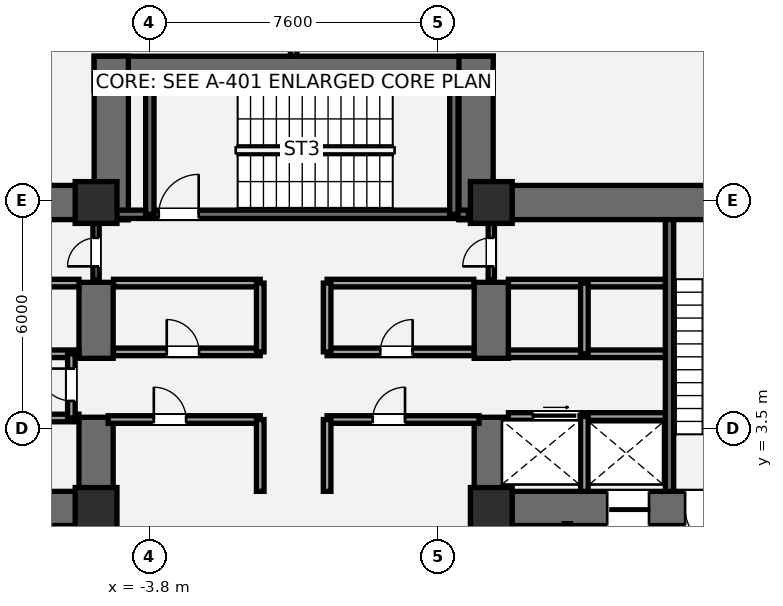
"""IFC4 building model, lengths in metres.
Left out: names, types, materials, properties, quantities, classifications, styles, units other than length and angle.
Written with IfcOpenShell. Run it as: python <this file> out.ifc"""

import sys

from ifc_helpers import new_model, si_unit, direction, frame, frame_2d, origin, origin_2d, place, context, subcontext, project, spatial, rectangle, extrude, element, fill, save


model = new_model("IFC4")
c1 = context("Model", 3, precision=1e-05, world=origin(), true_north=direction((0.0, 1.0)))
c2 = subcontext(c1, "Body", "Model", "MODEL_VIEW")
j1 = project(units=[si_unit("LENGTHUNIT", "METRE"), si_unit("PLANEANGLEUNIT", "RADIAN")], contexts=[c1])
p1 = place(None, origin())
s1 = spatial("IfcSite", under=j1, at=p1, CompositionType="ELEMENT")
p2 = place(p1, origin())
s2 = spatial("IfcBuilding", under=s1, at=p2, CompositionType="ELEMENT")
p3 = place(p2, frame((0.0, 0.0, -8.8)))
s3 = spatial("IfcBuildingStorey", under=s2, at=p3, CompositionType="ELEMENT", Elevation=-8.8)
p4 = place(p3, frame((-14.05, 9.45, 0.0), z_axis=(0.0, 0.0, 1.0), x_axis=(1.0, 0.0, 0.0)))
e1 = element("IfcWall", 1, at=p4, inside=s3, PredefinedType="SHEAR", context=c2, shape_type="SweptSolid", body=[
    extrude(rectangle(XDim=9.7, YDim=0.9, at=frame_2d((4.85, 0.0))), origin(), (0.0, 0.0, 1.0), 4.4),
])
p5 = place(p3, frame((-4.75, 1.4, 0.0), z_axis=(0.0, 0.0, 1.0), x_axis=(-1.0, 0.0, 0.0)))
e2 = element("IfcWall", 2, at=p5, inside=s3, PredefinedType="SHEAR", context=c2, shape_type="SweptSolid", body=[
    extrude(rectangle(XDim=9.3, YDim=0.9, at=frame_2d((4.65, 0.0))), origin(), (0.0, 0.0, 1.0), 4.4),
])
p6 = place(p5, frame((5.55, 0.0, 0.0)))
e3 = element("IfcOpeningElement", 3, at=p6, cuts=e2, PredefinedType="OPENING", context=c2, shape_type="SweptSolid", body=[
    extrude(rectangle(XDim=1.05, YDim=2.15, at=frame_2d((0.525, 1.075))), frame((0.0, 0.46, 0.0), z_axis=(0.0, -1.0, 0.0), x_axis=(1.0, 0.0, 0.0)), (0.0, 0.0, 1.0), 0.92),
])
p7 = place(p5, frame((3.88, 0.0, 0.0)))
e4 = element("IfcOpeningElement", 4, at=p7, cuts=e2, PredefinedType="OPENING", context=c2, shape_type="SweptSolid", body=[
    extrude(rectangle(XDim=1.1, YDim=2.2, at=frame_2d((0.55, 1.1))), frame((0.0, 0.46, 0.0), z_axis=(0.0, -1.0, 0.0), x_axis=(1.0, 0.0, 0.0)), (0.0, 0.0, 1.0), 0.92),
])
p8 = place(p3, frame((-5.2, 0.95, 0.0), z_axis=(0.0, 0.0, 1.0), x_axis=(0.0, 1.0, 0.0)))
e5 = element("IfcWall", 5, at=p8, inside=s3, PredefinedType="SHEAR", context=c2, shape_type="SweptSolid", body=[
    extrude(rectangle(XDim=2.85, YDim=0.9, at=frame_2d((1.425, 0.0))), origin(), (0.0, 0.0, 1.0), 4.4),
])
p9 = place(p3, frame((-5.2, 5.35, 0.0), z_axis=(0.0, 0.0, 1.0), x_axis=(0.0, 1.0, 0.0)))
e6 = element("IfcWall", 6, at=p9, inside=s3, PredefinedType="SHEAR", context=c2, shape_type="SweptSolid", body=[
    extrude(rectangle(XDim=2.0, YDim=0.9, at=frame_2d((1.0, 0.0))), origin(), (0.0, 0.0, 1.0), 4.4),
])
p10 = place(p3, frame((4.35, 9.45, 0.0), z_axis=(0.0, 0.0, 1.0), x_axis=(1.0, 0.0, 0.0)))
e7 = element("IfcWall", 7, at=p10, inside=s3, PredefinedType="SHEAR", context=c2, shape_type="SweptSolid", body=[
    extrude(rectangle(XDim=9.7, YDim=0.9, at=frame_2d((4.85, 0.0))), origin(), (0.0, 0.0, 1.0), 4.4),
])
p11 = place(p3, frame((14.05, 1.4, 0.0), z_axis=(0.0, 0.0, 1.0), x_axis=(-1.0, 0.0, 0.0)))
e8 = element("IfcWall", 8, at=p11, inside=s3, PredefinedType="SHEAR", context=c2, shape_type="SweptSolid", body=[
    extrude(rectangle(XDim=9.3, YDim=0.9, at=frame_2d((4.65, 0.0))), origin(), (0.0, 0.0, 1.0), 4.4),
])
p12 = place(p11, frame((2.7, 0.0, 0.0)))
e9 = element("IfcOpeningElement", 9, at=p12, cuts=e8, PredefinedType="OPENING", context=c2, shape_type="SweptSolid", body=[
    extrude(rectangle(XDim=1.05, YDim=2.15, at=frame_2d((0.525, 1.075))), frame((0.0, 0.46, 0.0), z_axis=(0.0, -1.0, 0.0), x_axis=(1.0, 0.0, 0.0)), (0.0, 0.0, 1.0), 0.92),
])
p13 = place(p11, frame((4.7, 0.0, 0.0)))
e10 = element("IfcOpeningElement", 10, at=p13, cuts=e8, PredefinedType="OPENING", context=c2, shape_type="SweptSolid", body=[
    extrude(rectangle(XDim=1.1, YDim=2.2, at=frame_2d((0.55, 1.1))), frame((0.0, 0.46, 0.0), z_axis=(0.0, -1.0, 0.0), x_axis=(1.0, 0.0, 0.0)), (0.0, 0.0, 1.0), 0.92),
])
p14 = place(p3, frame((5.2, 0.95, 0.0), z_axis=(0.0, 0.0, 1.0), x_axis=(0.0, 1.0, 0.0)))
e11 = element("IfcWall", 11, at=p14, inside=s3, PredefinedType="SHEAR", context=c2, shape_type="SweptSolid", body=[
    extrude(rectangle(XDim=2.85, YDim=0.9, at=frame_2d((1.425, 0.0))), origin(), (0.0, 0.0, 1.0), 4.4),
])
p15 = place(p3, frame((5.2, 5.35, 0.0), z_axis=(0.0, 0.0, 1.0), x_axis=(0.0, 1.0, 0.0)))
e12 = element("IfcWall", 12, at=p15, inside=s3, PredefinedType="SHEAR", context=c2, shape_type="SweptSolid", body=[
    extrude(rectangle(XDim=2.0, YDim=0.9, at=frame_2d((1.0, 0.0))), origin(), (0.0, 0.0, 1.0), 4.4),
])
p16 = place(p3, frame((9.89, 1.85, 0.0), z_axis=(0.0, 0.0, 1.0), x_axis=(0.0, 1.0, 0.0)))
e13 = element("IfcWall", 13, at=p16, inside=s3, PredefinedType="SHEAR", context=c2, shape_type="SweptSolid", body=[
    extrude(rectangle(XDim=7.15, YDim=0.22, at=frame_2d((3.575, 0.0))), origin(), (0.0, 0.0, 1.0), 4.4),
])
p17 = place(p3, frame((-5.25, 12.85, 0.0), z_axis=(0.0, 0.0, 1.0), x_axis=(1.0, 0.0, 0.0)))
e14 = element("IfcWall", 14, at=p17, inside=s3, PredefinedType="SHEAR", context=c2, shape_type="SweptSolid", body=[
    extrude(rectangle(XDim=10.5, YDim=0.9, at=frame_2d((5.25, 0.0))), origin(), (0.0, 0.0, 1.0), 4.4),
])
for number, where, z_axis, x_axis in (
    (15, (-4.8, 9.0, 0.0), (0.0, 0.0, 1.0), (0.0, 1.0, 0.0)),
    (16, (4.8, 9.0, 0.0), (0.0, 0.0, 1.0), (0.0, 1.0, 0.0)),
):
    element("IfcWall", number, at=place(p3, frame(where, z_axis=z_axis, x_axis=x_axis)), inside=s3, PredefinedType="SHEAR", context=c2, shape_type="SweptSolid", body=[
        extrude(rectangle(XDim=4.3, YDim=0.9, at=frame_2d((2.15, 0.0))), origin(), (0.0, 0.0, 1.0), 4.4),
    ])
p18 = place(p3, frame((-4.7, 9.14, 0.0), z_axis=(0.0, 0.0, 1.0), x_axis=(1.0, 0.0, 0.0)))
e17 = element("IfcWall", 17, at=p18, inside=s3, PredefinedType="SHEAR", context=c2, shape_type="SweptSolid", body=[
    extrude(rectangle(XDim=9.3, YDim=0.22, at=frame_2d((4.65, 0.0))), origin(), (0.0, 0.0, 1.0), 4.4),
])
p19 = place(p18, frame((1.15, 0.0, 0.0)))
e18 = element("IfcOpeningElement", 18, at=p19, cuts=e17, PredefinedType="OPENING", context=c2, shape_type="SweptSolid", body=[
    extrude(rectangle(XDim=1.05, YDim=2.15, at=frame_2d((0.525, 1.075))), frame((0.0, 0.12, 0.0), z_axis=(0.0, -1.0, 0.0), x_axis=(1.0, 0.0, 0.0)), (0.0, 0.0, 1.0), 0.24),
])
for number, where, z_axis, x_axis in (
    (19, (-3.785, 9.14, 0.0), (0.0, 0.0, 1.0), (0.0, 1.0, 0.0)),
    (20, (4.215, 9.14, 0.0), (0.0, 0.0, 1.0), (0.0, 1.0, 0.0)),
):
    element("IfcWall", number, at=place(p3, frame(where, z_axis=z_axis, x_axis=x_axis)), inside=s3, PredefinedType="SHEAR", context=c2, shape_type="SweptSolid", body=[
        extrude(rectangle(XDim=3.26, YDim=0.22, at=frame_2d((1.63, 0.0))), origin(), (0.0, 0.0, 1.0), 4.4),
    ])
for number, where, z_axis, x_axis in (
    (21, (-5.2, 1.4, 0.0), (0.0, 0.0, 1.0), (1.0, 0.0, 0.0)),
    (22, (-5.2, 9.45, 0.0), (0.0, 0.0, 1.0), (1.0, 0.0, 0.0)),
    (23, (5.2, 1.4, 0.0), (0.0, 0.0, 1.0), (1.0, 0.0, 0.0)),
    (24, (5.2, 9.45, 0.0), (0.0, 0.0, 1.0), (1.0, 0.0, 0.0)),
):
    element("IfcColumn", number, at=place(p3, frame(where, z_axis=z_axis, x_axis=x_axis)), inside=s3, PredefinedType="COLUMN", context=c2, shape_type="SweptSolid", body=[
        extrude(rectangle(XDim=1.1, YDim=1.1, at=origin_2d()), origin(), (0.0, 0.0, 1.0), 4.4),
    ])
p20 = place(p3, frame((-4.95, -2.15, 0.0), z_axis=(0.0, 0.0, 1.0), x_axis=(0.0, 1.0, 0.0)))
e25 = element("IfcWall", 25, at=p20, inside=s3, PredefinedType="SOLIDWALL", context=c2, shape_type="SweptSolid", body=[
    extrude(rectangle(XDim=3.15, YDim=0.2, at=frame_2d((1.575, 0.0))), origin(), (0.0, 0.0, 1.0), 3.508),
])
p21 = place(p20, frame((0.95, 0.0, 0.0)))
e26 = element("IfcOpeningElement", 26, at=p21, cuts=e25, PredefinedType="OPENING", context=c2, shape_type="SweptSolid", body=[
    extrude(rectangle(XDim=0.75, YDim=2.1, at=frame_2d((0.375, 1.05))), frame((0.0, 0.11, 0.0), z_axis=(0.0, -1.0, 0.0), x_axis=(1.0, 0.0, 0.0)), (0.0, 0.0, 1.0), 0.22),
])
p22 = place(p3, frame((7.2, -2.15, 0.0), z_axis=(0.0, 0.0, 1.0), x_axis=(0.0, 1.0, 0.0)))
e27 = element("IfcWall", 27, at=p22, inside=s3, PredefinedType="PARTITIONING", context=c2, shape_type="SweptSolid", body=[
    extrude(rectangle(XDim=3.15, YDim=0.165, at=frame_2d((1.575, 0.0))), origin(), (0.0, 0.0, 1.0), 4.14),
])
p23 = place(p3, frame((4.95, -2.15, 0.0), z_axis=(0.0, 0.0, 1.0), x_axis=(0.0, 1.0, 0.0)))
e28 = element("IfcWall", 28, at=p23, inside=s3, PredefinedType="SOLIDWALL", context=c2, shape_type="SweptSolid", body=[
    extrude(rectangle(XDim=3.15, YDim=0.2, at=frame_2d((1.575, 0.0))), origin(), (0.0, 0.0, 1.0), 3.508),
])
p24 = place(p23, frame((0.95, 0.0, 0.0)))
e29 = element("IfcOpeningElement", 29, at=p24, cuts=e28, PredefinedType="OPENING", context=c2, shape_type="SweptSolid", body=[
    extrude(rectangle(XDim=0.75, YDim=2.1, at=frame_2d((0.375, 1.05))), frame((0.0, 0.11, 0.0), z_axis=(0.0, -1.0, 0.0), x_axis=(1.0, 0.0, 0.0)), (0.0, 0.0, 1.0), 0.22),
])
for number, where, z_axis, x_axis in (
    (30, (-9.78, 3.78, 0.0), (0.0, 0.0, 1.0), (1.0, 0.0, 0.0)),
    (31, (-9.78, 5.47, 0.0), (0.0, 0.0, 1.0), (1.0, 0.0, 0.0)),
    (32, (-9.78, 7.33, 0.0), (0.0, 0.0, 1.0), (1.0, 0.0, 0.0)),
):
    element("IfcWall", number, at=place(p3, frame(where, z_axis=z_axis, x_axis=x_axis)), inside=s3, PredefinedType="SOLIDWALL", context=c2, shape_type="SweptSolid", body=[
        extrude(rectangle(XDim=4.13, YDim=0.2, at=frame_2d((2.065, 0.0))), origin(), (0.0, 0.0, 1.0), 4.14),
    ])
p25 = place(p3, frame((-5.85, 3.78, 0.0), z_axis=(0.0, 0.0, 1.0), x_axis=(0.0, 1.0, 0.0)))
e33 = element("IfcWall", 33, at=p25, inside=s3, PredefinedType="SOLIDWALL", context=c2, shape_type="SweptSolid", body=[
    extrude(rectangle(XDim=1.69, YDim=0.2, at=frame_2d((0.845, 0.0))), origin(), (0.0, 0.0, 1.0), 4.14),
])
p26 = place(p25, frame((0.45, 0.0, 0.0)))
e34 = element("IfcOpeningElement", 34, at=p26, cuts=e33, PredefinedType="OPENING", context=c2, shape_type="SweptSolid", body=[
    extrude(rectangle(XDim=0.85, YDim=2.1, at=frame_2d((0.425, 1.05))), frame((0.0, 0.11, 0.0), z_axis=(0.0, -1.0, 0.0), x_axis=(1.0, 0.0, 0.0)), (0.0, 0.0, 1.0), 0.22),
])
p27 = place(p3, frame((5.65, 3.82, 0.0), z_axis=(0.0, 0.0, 1.0), x_axis=(1.0, 0.0, 0.0)))
e35 = element("IfcWall", 35, at=p27, inside=s3, PredefinedType="SOLIDWALL", context=c2, shape_type="SweptSolid", body=[
    extrude(rectangle(XDim=4.13, YDim=0.2, at=frame_2d((2.065, 0.0))), origin(), (0.0, 0.0, 1.0), 4.14),
])
p28 = place(p27, frame((0.65, 0.0, 0.0)))
e36 = element("IfcOpeningElement", 36, at=p28, cuts=e35, PredefinedType="OPENING", context=c2, shape_type="SweptSolid", body=[
    extrude(rectangle(XDim=1.2, YDim=2.2, at=frame_2d((0.6, 1.1))), frame((0.0, 0.11, 0.0), z_axis=(0.0, -1.0, 0.0), x_axis=(1.0, 0.0, 0.0)), (0.0, 0.0, 1.0), 0.22),
])
p29 = place(p3, frame((7.65, 1.85, 0.0), z_axis=(0.0, 0.0, 1.0), x_axis=(0.0, 1.0, 0.0)))
e37 = element("IfcWall", 37, at=p29, inside=s3, PredefinedType="SOLIDWALL", context=c2, shape_type="SweptSolid", body=[
    extrude(rectangle(XDim=1.97, YDim=0.2, at=frame_2d((0.985, 0.0))), origin(), (0.0, 0.0, 1.0), 4.14),
])
for number, where, z_axis, x_axis in (
    (38, (5.65, 5.47, 0.0), (0.0, 0.0, 1.0), (1.0, 0.0, 0.0)),
    (39, (5.65, 7.33, 0.0), (0.0, 0.0, 1.0), (1.0, 0.0, 0.0)),
):
    element("IfcWall", number, at=place(p3, frame(where, z_axis=z_axis, x_axis=x_axis)), inside=s3, PredefinedType="SOLIDWALL", context=c2, shape_type="SweptSolid", body=[
        extrude(rectangle(XDim=4.13, YDim=0.2, at=frame_2d((2.065, 0.0))), origin(), (0.0, 0.0, 1.0), 4.14),
    ])
p30 = place(p3, frame((7.65, 5.47, 0.0), z_axis=(0.0, 0.0, 1.0), x_axis=(0.0, 1.0, 0.0)))
e40 = element("IfcWall", 40, at=p30, inside=s3, PredefinedType="SOLIDWALL", context=c2, shape_type="SweptSolid", body=[
    extrude(rectangle(XDim=1.86, YDim=0.2, at=frame_2d((0.93, 0.0))), origin(), (0.0, 0.0, 1.0), 4.14),
])
p31 = place(p3, frame((-4.88, 3.74, 0.0), z_axis=(0.0, 0.0, 1.0), x_axis=(1.0, 0.0, 0.0)))
e41 = element("IfcWall", 41, at=p31, inside=s3, PredefinedType="SOLIDWALL", context=c2, shape_type="SweptSolid", body=[
    extrude(rectangle(XDim=4.0, YDim=0.2, at=frame_2d((2.0, 0.0))), origin(), (0.0, 0.0, 1.0), 4.14),
])
p32 = place(p31, frame((1.2, 0.0, 0.0)))
e42 = element("IfcOpeningElement", 42, at=p32, cuts=e41, PredefinedType="OPENING", context=c2, shape_type="SweptSolid", body=[
    extrude(rectangle(XDim=0.85, YDim=2.1, at=frame_2d((0.425, 1.05))), frame((0.0, 0.11, 0.0), z_axis=(0.0, -1.0, 0.0), x_axis=(1.0, 0.0, 0.0)), (0.0, 0.0, 1.0), 0.22),
])
p33 = place(p3, frame((0.88, 3.74, 0.0), z_axis=(0.0, 0.0, 1.0), x_axis=(1.0, 0.0, 0.0)))
e43 = element("IfcWall", 43, at=p33, inside=s3, PredefinedType="SOLIDWALL", context=c2, shape_type="SweptSolid", body=[
    extrude(rectangle(XDim=4.0, YDim=0.2, at=frame_2d((2.0, 0.0))), origin(), (0.0, 0.0, 1.0), 4.14),
])
p34 = place(p33, frame((1.2, 0.0, 0.0)))
e44 = element("IfcOpeningElement", 44, at=p34, cuts=e43, PredefinedType="OPENING", context=c2, shape_type="SweptSolid", body=[
    extrude(rectangle(XDim=0.85, YDim=2.1, at=frame_2d((0.425, 1.05))), frame((0.0, 0.11, 0.0), z_axis=(0.0, -1.0, 0.0), x_axis=(1.0, 0.0, 0.0)), (0.0, 0.0, 1.0), 0.22),
])
for number, where, z_axis, x_axis in (
    (45, (-0.88, 1.85, 0.0), (0.0, 0.0, 1.0), (0.0, 1.0, 0.0)),
    (46, (0.88, 1.85, 0.0), (0.0, 0.0, 1.0), (0.0, 1.0, 0.0)),
):
    element("IfcWall", number, at=place(p3, frame(where, z_axis=z_axis, x_axis=x_axis)), inside=s3, PredefinedType="SOLIDWALL", context=c2, shape_type="SweptSolid", body=[
        extrude(rectangle(XDim=1.89, YDim=0.2, at=frame_2d((0.945, 0.0))), origin(), (0.0, 0.0, 1.0), 4.14),
    ])
p35 = place(p3, frame((-4.74, 5.52, 0.0), z_axis=(0.0, 0.0, 1.0), x_axis=(1.0, 0.0, 0.0)))
e47 = element("IfcWall", 47, at=p35, inside=s3, PredefinedType="SOLIDWALL", context=c2, shape_type="SweptSolid", body=[
    extrude(rectangle(XDim=3.86, YDim=0.2, at=frame_2d((1.93, 0.0))), origin(), (0.0, 0.0, 1.0), 4.14),
])
p36 = place(p35, frame((1.4, 0.0, 0.0)))
e48 = element("IfcOpeningElement", 48, at=p36, cuts=e47, PredefinedType="OPENING", context=c2, shape_type="SweptSolid", body=[
    extrude(rectangle(XDim=0.85, YDim=2.1, at=frame_2d((0.425, 1.05))), frame((0.0, 0.11, 0.0), z_axis=(0.0, -1.0, 0.0), x_axis=(1.0, 0.0, 0.0)), (0.0, 0.0, 1.0), 0.22),
])
p37 = place(p3, frame((0.88, 5.52, 0.0), z_axis=(0.0, 0.0, 1.0), x_axis=(1.0, 0.0, 0.0)))
e49 = element("IfcWall", 49, at=p37, inside=s3, PredefinedType="SOLIDWALL", context=c2, shape_type="SweptSolid", body=[
    extrude(rectangle(XDim=3.86, YDim=0.2, at=frame_2d((1.93, 0.0))), origin(), (0.0, 0.0, 1.0), 4.14),
])
p38 = place(p37, frame((1.4, 0.0, 0.0)))
e50 = element("IfcOpeningElement", 50, at=p38, cuts=e49, PredefinedType="OPENING", context=c2, shape_type="SweptSolid", body=[
    extrude(rectangle(XDim=0.85, YDim=2.1, at=frame_2d((0.425, 1.05))), frame((0.0, 0.11, 0.0), z_axis=(0.0, -1.0, 0.0), x_axis=(1.0, 0.0, 0.0)), (0.0, 0.0, 1.0), 0.22),
])
for number, where, z_axis, x_axis in (
    (51, (-4.74, 7.33, 0.0), (0.0, 0.0, 1.0), (1.0, 0.0, 0.0)),
    (52, (0.88, 7.33, 0.0), (0.0, 0.0, 1.0), (1.0, 0.0, 0.0)),
):
    element("IfcWall", number, at=place(p3, frame(where, z_axis=z_axis, x_axis=x_axis)), inside=s3, PredefinedType="SOLIDWALL", context=c2, shape_type="SweptSolid", body=[
        extrude(rectangle(XDim=3.86, YDim=0.2, at=frame_2d((1.93, 0.0))), origin(), (0.0, 0.0, 1.0), 4.14),
    ])
for number, where, z_axis, x_axis in (
    (53, (-0.88, 5.52, 0.0), (0.0, 0.0, 1.0), (0.0, 1.0, 0.0)),
    (54, (0.88, 5.52, 0.0), (0.0, 0.0, 1.0), (0.0, 1.0, 0.0)),
):
    element("IfcWall", number, at=place(p3, frame(where, z_axis=z_axis, x_axis=x_axis)), inside=s3, PredefinedType="SOLIDWALL", context=c2, shape_type="SweptSolid", body=[
        extrude(rectangle(XDim=1.81, YDim=0.2, at=frame_2d((0.905, 0.0))), origin(), (0.0, 0.0, 1.0), 4.14),
    ])
p39 = place(p3, frame((-5.2, 7.42, 0.0), z_axis=(0.0, 0.0, 1.0), x_axis=(0.0, 1.0, 0.0)))
e55 = element("IfcWall", 55, at=p39, inside=s3, PredefinedType="PARTITIONING", context=c2, shape_type="SweptSolid", body=[
    extrude(rectangle(XDim=1.58, YDim=0.165, at=frame_2d((0.79, 0.0))), origin(), (0.0, 0.0, 1.0), 4.14),
])
p40 = place(p39, frame((0.35, 0.0, 0.0)))
e56 = element("IfcOpeningElement", 56, at=p40, cuts=e55, PredefinedType="OPENING", context=c2, shape_type="SweptSolid", body=[
    extrude(rectangle(XDim=0.75, YDim=2.1, at=frame_2d((0.375, 1.05))), frame((0.0, 0.093, 0.0), z_axis=(0.0, -1.0, 0.0), x_axis=(1.0, 0.0, 0.0)), (0.0, 0.0, 1.0), 0.185),
])
p41 = place(p3, frame((5.2, 7.42, 0.0), z_axis=(0.0, 0.0, 1.0), x_axis=(0.0, 1.0, 0.0)))
e57 = element("IfcWall", 57, at=p41, inside=s3, PredefinedType="PARTITIONING", context=c2, shape_type="SweptSolid", body=[
    extrude(rectangle(XDim=1.58, YDim=0.165, at=frame_2d((0.79, 0.0))), origin(), (0.0, 0.0, 1.0), 4.14),
])
p42 = place(p41, frame((0.35, 0.0, 0.0)))
e58 = element("IfcOpeningElement", 58, at=p42, cuts=e57, PredefinedType="OPENING", context=c2, shape_type="SweptSolid", body=[
    extrude(rectangle(XDim=0.75, YDim=2.1, at=frame_2d((0.375, 1.05))), frame((0.0, 0.093, 0.0), z_axis=(0.0, -1.0, 0.0), x_axis=(1.0, 0.0, 0.0)), (0.0, 0.0, 1.0), 0.185),
])
p43 = place(p3, frame((0.0, 13.3, 0.0), z_axis=(0.0, 0.0, 1.0), x_axis=(0.0, 1.0, 0.0)))
e59 = element("IfcWall", 59, at=p43, inside=s3, PredefinedType="PARTITIONING", context=c2, shape_type="SweptSolid", body=[
    extrude(rectangle(XDim=7.787, YDim=0.175, at=frame_2d((3.894, 0.0))), origin(), (0.0, 0.0, 1.0), 4.14),
])
p44 = place(p12, origin())
e60 = element("IfcDoor", 60, at=p44, inside=s3, OperationType="SINGLE_SWING_LEFT", PredefinedType="DOOR", context=c2, shape_type="SweptSolid", body=[
    extrude(rectangle(XDim=1.05, YDim=2.15, at=frame_2d((0.525, 1.075))), frame((0.0, 0.025, 0.0), z_axis=(0.0, -1.0, 0.0), x_axis=(1.0, 0.0, 0.0)), (0.0, 0.0, 1.0), 0.05),
])
fill(e9, e60)
p45 = place(p19, origin())
e61 = element("IfcDoor", 61, at=p45, inside=s3, OperationType="SINGLE_SWING_RIGHT", PredefinedType="DOOR", context=c2, shape_type="SweptSolid", body=[
    extrude(rectangle(XDim=1.05, YDim=2.15, at=frame_2d((0.525, 1.075))), frame((0.0, 0.025, 0.0), z_axis=(0.0, -1.0, 0.0), x_axis=(1.0, 0.0, 0.0)), (0.0, 0.0, 1.0), 0.05),
])
fill(e18, e61)
p46 = place(p26, origin())
e62 = element("IfcDoor", 62, at=p46, inside=s3, OperationType="SINGLE_SWING_RIGHT", PredefinedType="DOOR", context=c2, shape_type="SweptSolid", body=[
    extrude(rectangle(XDim=0.85, YDim=2.1, at=frame_2d((0.425, 1.05))), frame((0.0, 0.025, 0.0), z_axis=(0.0, -1.0, 0.0), x_axis=(1.0, 0.0, 0.0)), (0.0, 0.0, 1.0), 0.05),
])
fill(e34, e62)
p47 = place(p13, origin())
e63 = element("IfcDoor", 63, at=p47, inside=s3, OperationType="SLIDING_TO_LEFT", PredefinedType="DOOR", context=c2, shape_type="SweptSolid", body=[
    extrude(rectangle(XDim=1.1, YDim=2.2, at=frame_2d((0.55, 1.1))), frame((0.0, 0.025, 0.0), z_axis=(0.0, -1.0, 0.0), x_axis=(1.0, 0.0, 0.0)), (0.0, 0.0, 1.0), 0.05),
])
fill(e10, e63)
p48 = place(p28, origin())
e64 = element("IfcDoor", 64, at=p48, inside=s3, OperationType="SLIDING_TO_RIGHT", PredefinedType="DOOR", context=c2, shape_type="SweptSolid", body=[
    extrude(rectangle(XDim=1.2, YDim=2.2, at=frame_2d((0.6, 1.1))), frame((0.0, 0.025, 0.0), z_axis=(0.0, -1.0, 0.0), x_axis=(1.0, 0.0, 0.0)), (0.0, 0.0, 1.0), 0.05),
])
fill(e36, e64)
p49 = place(p32, origin())
e65 = element("IfcDoor", 65, at=p49, inside=s3, OperationType="SINGLE_SWING_LEFT", PredefinedType="DOOR", context=c2, shape_type="SweptSolid", body=[
    extrude(rectangle(XDim=0.85, YDim=2.1, at=frame_2d((0.425, 1.05))), frame((0.0, 0.025, 0.0), z_axis=(0.0, -1.0, 0.0), x_axis=(1.0, 0.0, 0.0)), (0.0, 0.0, 1.0), 0.05),
])
fill(e42, e65)
p50 = place(p34, origin())
e66 = element("IfcDoor", 66, at=p50, inside=s3, OperationType="SINGLE_SWING_RIGHT", PredefinedType="DOOR", context=c2, shape_type="SweptSolid", body=[
    extrude(rectangle(XDim=0.85, YDim=2.1, at=frame_2d((0.425, 1.05))), frame((0.0, 0.025, 0.0), z_axis=(0.0, -1.0, 0.0), x_axis=(1.0, 0.0, 0.0)), (0.0, 0.0, 1.0), 0.05),
])
fill(e44, e66)
p51 = place(p36, origin())
e67 = element("IfcDoor", 67, at=p51, inside=s3, OperationType="SINGLE_SWING_LEFT", PredefinedType="DOOR", context=c2, shape_type="SweptSolid", body=[
    extrude(rectangle(XDim=0.85, YDim=2.1, at=frame_2d((0.425, 1.05))), frame((0.0, 0.025, 0.0), z_axis=(0.0, -1.0, 0.0), x_axis=(1.0, 0.0, 0.0)), (0.0, 0.0, 1.0), 0.05),
])
fill(e48, e67)
p52 = place(p38, origin())
e68 = element("IfcDoor", 68, at=p52, inside=s3, OperationType="SINGLE_SWING_RIGHT", PredefinedType="DOOR", context=c2, shape_type="SweptSolid", body=[
    extrude(rectangle(XDim=0.85, YDim=2.1, at=frame_2d((0.425, 1.05))), frame((0.0, 0.025, 0.0), z_axis=(0.0, -1.0, 0.0), x_axis=(1.0, 0.0, 0.0)), (0.0, 0.0, 1.0), 0.05),
])
fill(e50, e68)
p53 = place(p40, origin())
e69 = element("IfcDoor", 69, at=p53, inside=s3, OperationType="SINGLE_SWING_LEFT", PredefinedType="DOOR", context=c2, shape_type="SweptSolid", body=[
    extrude(rectangle(XDim=0.75, YDim=2.1, at=frame_2d((0.375, 1.05))), frame((0.0, 0.025, 0.0), z_axis=(0.0, -1.0, 0.0), x_axis=(1.0, 0.0, 0.0)), (0.0, 0.0, 1.0), 0.05),
])
fill(e56, e69)
p54 = place(p42, origin())
e70 = element("IfcDoor", 70, at=p54, inside=s3, OperationType="SINGLE_SWING_LEFT", PredefinedType="DOOR", context=c2, shape_type="SweptSolid", body=[
    extrude(rectangle(XDim=0.75, YDim=2.1, at=frame_2d((0.375, 1.05))), frame((0.0, 0.025, 0.0), z_axis=(0.0, -1.0, 0.0), x_axis=(1.0, 0.0, 0.0)), (0.0, 0.0, 1.0), 0.05),
])
fill(e58, e70)
save(model, sys.argv[1])
